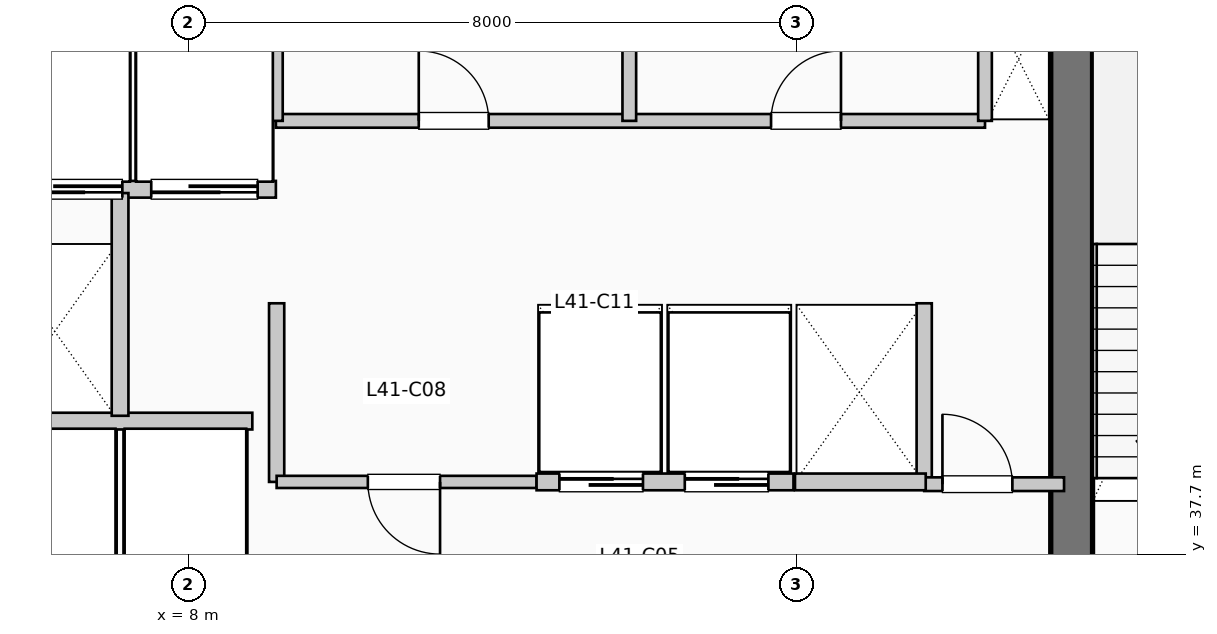
"""IFC4 building model, lengths in metres.
Left out: names, types, materials, properties, quantities, classifications, styles, units other than length and angle.
Written with IfcOpenShell. Run it as: python <this file> out.ifc"""

import sys

from ifc_helpers import new_model, si_unit, direction, frame, frame_2d, origin, place, context, subcontext, project, spatial, rectangle, extrude, element, fill, save


model = new_model("IFC4")
c1 = context("Model", 3, precision=1e-05, world=origin(), true_north=direction((0.0, 1.0)))
c2 = subcontext(c1, "Body", "Model", "MODEL_VIEW")
j1 = project(units=[si_unit("LENGTHUNIT", "METRE"), si_unit("PLANEANGLEUNIT", "RADIAN")], contexts=[c1])
p1 = place(None, origin())
s1 = spatial("IfcSite", under=j1, at=p1, CompositionType="ELEMENT")
p2 = place(p1, origin())
s2 = spatial("IfcBuilding", under=s1, at=p2, CompositionType="ELEMENT")
p3 = place(p2, frame((0.0, 0.0, 170.61)))
s3 = spatial("IfcBuildingStorey", under=s2, at=p3, CompositionType="ELEMENT", Elevation=170.61)
p4 = place(p3, frame((19.62, 37.15, 0.0), z_axis=(0.0, 0.0, 1.0), x_axis=(0.0, 1.0, 0.0)))
e1 = element("IfcWall", 1, at=p4, inside=s3, PredefinedType="SHEAR", context=c2, shape_type="SweptSolid", body=[
    extrude(rectangle(XDim=7.89, YDim=0.55, at=frame_2d((3.945, 0.0))), origin(), (0.0, 0.0, 1.0), 3.96),
])
p5 = place(p3, frame((5.38, 39.45, 0.0), z_axis=(0.0, 0.0, 1.0), x_axis=(1.0, 0.0, 0.0)))
e2 = element("IfcWall", 2, at=p5, inside=s3, PredefinedType="PARTITIONING", context=c2, shape_type="SweptSolid", body=[
    extrude(rectangle(XDim=3.46, YDim=0.22, at=frame_2d((1.73, 0.0))), origin(), (0.0, 0.0, 1.0), 3.61),
])
p6 = place(p3, frame((5.38, 42.5, 0.0), z_axis=(0.0, 0.0, 1.0), x_axis=(1.0, 0.0, 0.0)))
e3 = element("IfcWall", 3, at=p6, inside=s3, PredefinedType="PARTITIONING", context=c2, shape_type="SweptSolid", body=[
    extrude(rectangle(XDim=3.77, YDim=0.22, at=frame_2d((1.885, 0.0))), origin(), (0.0, 0.0, 1.0), 3.61),
])
p7 = place(p6, frame((1.75, 0.0, 0.0), z_axis=(0.0, 0.0, 1.0), x_axis=(-1.0, 0.0, 0.0)))
e4 = element("IfcOpeningElement", 4, at=p7, cuts=e3, PredefinedType="OPENING", context=c2, shape_type="SweptSolid", body=[
    extrude(rectangle(XDim=1.4, YDim=2.2, at=frame_2d((0.7, 1.1))), frame((0.0, 0.12, 0.0), z_axis=(0.0, -1.0, 0.0), x_axis=(1.0, 0.0, 0.0)), (0.0, 0.0, 1.0), 0.24),
])
p8 = place(p6, frame((3.53, 0.0, 0.0), z_axis=(0.0, 0.0, 1.0), x_axis=(-1.0, 0.0, 0.0)))
e5 = element("IfcOpeningElement", 5, at=p8, cuts=e3, PredefinedType="OPENING", context=c2, shape_type="SweptSolid", body=[
    extrude(rectangle(XDim=1.4, YDim=2.2, at=frame_2d((0.7, 1.1))), frame((0.0, 0.12, 0.0), z_axis=(0.0, -1.0, 0.0), x_axis=(1.0, 0.0, 0.0)), (0.0, 0.0, 1.0), 0.24),
])
p9 = place(p3, frame((7.1, 39.52, 0.0), z_axis=(0.0, 0.0, 1.0), x_axis=(0.0, 1.0, 0.0)))
e6 = element("IfcWall", 6, at=p9, inside=s3, PredefinedType="PARTITIONING", context=c2, shape_type="SweptSolid", body=[
    extrude(rectangle(XDim=2.93, YDim=0.22, at=frame_2d((1.465, 0.0))), origin(), (0.0, 0.0, 1.0), 3.61),
])
for number, where, z_axis, x_axis in (
    (7, (9.16, 38.65, 0.0), (0.0, 0.0, 1.0), (0.0, 1.0, 0.0)),
    (8, (17.68, 38.65, 0.0), (0.0, 0.0, 1.0), (0.0, 1.0, 0.0)),
):
    element("IfcWall", number, at=place(p3, frame(where, z_axis=z_axis, x_axis=x_axis)), inside=s3, PredefinedType="PARTITIONING", context=c2, shape_type="SweptSolid", body=[
        extrude(rectangle(XDim=2.35, YDim=0.2, at=frame_2d((1.175, 0.0))), origin(), (0.0, 0.0, 1.0), 3.61),
    ])
p10 = place(p3, frame((17.68, 38.62, 0.0), z_axis=(0.0, 0.0, 1.0), x_axis=(1.0, 0.0, 0.0)))
e9 = element("IfcWall", 9, at=p10, inside=s3, PredefinedType="PARTITIONING", context=c2, shape_type="SweptSolid", body=[
    extrude(rectangle(XDim=1.84, YDim=0.18, at=frame_2d((0.92, 0.0))), origin(), (0.0, 0.0, 1.0), 3.61),
])
p11 = place(p10, frame((0.24, 0.0, 0.0)))
e10 = element("IfcOpeningElement", 10, at=p11, cuts=e9, PredefinedType="OPENING", context=c2, shape_type="SweptSolid", body=[
    extrude(rectangle(XDim=0.92, YDim=2.1, at=frame_2d((0.46, 1.05))), frame((0.0, 0.1, 0.0), z_axis=(0.0, -1.0, 0.0), x_axis=(1.0, 0.0, 0.0)), (0.0, 0.0, 1.0), 0.2),
])
p12 = place(p3, frame((9.16, 38.65, 0.0), z_axis=(0.0, 0.0, 1.0), x_axis=(1.0, 0.0, 0.0)))
e11 = element("IfcWall", 11, at=p12, inside=s3, PredefinedType="PARTITIONING", context=c2, shape_type="SweptSolid", body=[
    extrude(rectangle(XDim=3.42, YDim=0.16, at=frame_2d((1.71, 0.0))), origin(), (0.0, 0.0, 1.0), 3.61),
])
p13 = place(p12, frame((2.15, 0.0, 0.0), z_axis=(0.0, 0.0, 1.0), x_axis=(-1.0, 0.0, 0.0)))
e12 = element("IfcOpeningElement", 12, at=p13, cuts=e11, PredefinedType="OPENING", context=c2, shape_type="SweptSolid", body=[
    extrude(rectangle(XDim=0.95, YDim=2.15, at=frame_2d((0.475, 1.075))), frame((0.0, 0.09, 0.0), z_axis=(0.0, -1.0, 0.0), x_axis=(1.0, 0.0, 0.0)), (0.0, 0.0, 1.0), 0.18),
])
p14 = place(p3, frame((12.58, 38.65, 0.0), z_axis=(0.0, 0.0, 1.0), x_axis=(1.0, 0.0, 0.0)))
e13 = element("IfcWall", 13, at=p14, inside=s3, PredefinedType="PARTITIONING", context=c2, shape_type="SweptSolid", body=[
    extrude(rectangle(XDim=3.38, YDim=0.22, at=frame_2d((1.69, 0.0))), origin(), (0.0, 0.0, 1.0), 3.61),
])
p15 = place(p14, frame((0.3, 0.0, 0.0)))
e14 = element("IfcOpeningElement", 14, at=p15, cuts=e13, PredefinedType="OPENING", context=c2, shape_type="SweptSolid", body=[
    extrude(rectangle(XDim=1.1, YDim=2.2, at=frame_2d((0.55, 1.1))), frame((0.0, 0.12, 0.0), z_axis=(0.0, -1.0, 0.0), x_axis=(1.0, 0.0, 0.0)), (0.0, 0.0, 1.0), 0.24),
])
p16 = place(p14, frame((1.95, 0.0, 0.0)))
e15 = element("IfcOpeningElement", 15, at=p16, cuts=e13, PredefinedType="OPENING", context=c2, shape_type="SweptSolid", body=[
    extrude(rectangle(XDim=1.1, YDim=2.2, at=frame_2d((0.55, 1.1))), frame((0.0, 0.12, 0.0), z_axis=(0.0, -1.0, 0.0), x_axis=(1.0, 0.0, 0.0)), (0.0, 0.0, 1.0), 0.24),
])
p17 = place(p3, frame((15.98, 38.65, 0.0), z_axis=(0.0, 0.0, 1.0), x_axis=(1.0, 0.0, 0.0)))
e16 = element("IfcWall", 16, at=p17, inside=s3, PredefinedType="PARTITIONING", context=c2, shape_type="SweptSolid", body=[
    extrude(rectangle(XDim=1.72, YDim=0.22, at=frame_2d((0.86, 0.0))), origin(), (0.0, 0.0, 1.0), 3.61),
])
p18 = place(p3, frame((9.15, 43.4, 0.0), z_axis=(0.0, 0.0, 1.0), x_axis=(1.0, 0.0, 0.0)))
e17 = element("IfcWall", 17, at=p18, inside=s3, PredefinedType="PLUMBINGWALL", context=c2, shape_type="SweptSolid", body=[
    extrude(rectangle(XDim=9.33, YDim=0.18, at=frame_2d((4.665, 0.0))), origin(), (0.0, 0.0, 1.0), 3.61),
])
p19 = place(p18, frame((1.88, 0.0, 0.0)))
e18 = element("IfcOpeningElement", 18, at=p19, cuts=e17, PredefinedType="OPENING", context=c2, shape_type="SweptSolid", body=[
    extrude(rectangle(XDim=0.92, YDim=2.1, at=frame_2d((0.46, 1.05))), frame((0.0, 0.1, 0.0), z_axis=(0.0, -1.0, 0.0), x_axis=(1.0, 0.0, 0.0)), (0.0, 0.0, 1.0), 0.2),
])
p20 = place(p18, frame((6.515, 0.0, 0.0)))
e19 = element("IfcOpeningElement", 19, at=p20, cuts=e17, PredefinedType="OPENING", context=c2, shape_type="SweptSolid", body=[
    extrude(rectangle(XDim=0.92, YDim=2.1, at=frame_2d((0.46, 1.05))), frame((0.0, 0.1, 0.0), z_axis=(0.0, -1.0, 0.0), x_axis=(1.0, 0.0, 0.0)), (0.0, 0.0, 1.0), 0.2),
])
for number, where, z_axis, x_axis in (
    (20, (9.15, 43.4, 0.0), (0.0, 0.0, 1.0), (0.0, 1.0, 0.0)),
    (21, (18.48, 43.4, 0.0), (0.0, 0.0, 1.0), (0.0, 1.0, 0.0)),
    (22, (13.8, 43.4, 0.0), (0.0, 0.0, 1.0), (0.0, 1.0, 0.0)),
):
    element("IfcWall", number, at=place(p3, frame(where, z_axis=z_axis, x_axis=x_axis)), inside=s3, PredefinedType="PLUMBINGWALL", context=c2, shape_type="SweptSolid", body=[
        extrude(rectangle(XDim=1.88, YDim=0.18, at=frame_2d((0.94, 0.0))), origin(), (0.0, 0.0, 1.0), 3.61),
    ])
p21 = place(p7, origin())
e23 = element("IfcDoor", 23, at=p21, inside=s3, OperationType="SLIDING_TO_LEFT", PredefinedType="DOOR", context=c2, shape_type="SweptSolid", body=[
    extrude(rectangle(XDim=1.4, YDim=2.2, at=frame_2d((0.7, 1.1))), frame((0.0, 0.025, 0.0), z_axis=(0.0, -1.0, 0.0), x_axis=(1.0, 0.0, 0.0)), (0.0, 0.0, 1.0), 0.05),
])
fill(e4, e23)
p22 = place(p8, origin())
e24 = element("IfcDoor", 24, at=p22, inside=s3, OperationType="SLIDING_TO_LEFT", PredefinedType="DOOR", context=c2, shape_type="SweptSolid", body=[
    extrude(rectangle(XDim=1.4, YDim=2.2, at=frame_2d((0.7, 1.1))), frame((0.0, 0.025, 0.0), z_axis=(0.0, -1.0, 0.0), x_axis=(1.0, 0.0, 0.0)), (0.0, 0.0, 1.0), 0.05),
])
fill(e5, e24)
p23 = place(p11, origin())
e25 = element("IfcDoor", 25, at=p23, inside=s3, OperationType="SINGLE_SWING_LEFT", PredefinedType="DOOR", context=c2, shape_type="SweptSolid", body=[
    extrude(rectangle(XDim=0.92, YDim=2.1, at=frame_2d((0.46, 1.05))), frame((0.0, 0.025, 0.0), z_axis=(0.0, -1.0, 0.0), x_axis=(1.0, 0.0, 0.0)), (0.0, 0.0, 1.0), 0.05),
])
fill(e10, e25)
p24 = place(p13, origin())
e26 = element("IfcDoor", 26, at=p24, inside=s3, OperationType="SINGLE_SWING_RIGHT", PredefinedType="DOOR", context=c2, shape_type="SweptSolid", body=[
    extrude(rectangle(XDim=0.95, YDim=2.15, at=frame_2d((0.475, 1.075))), frame((0.0, 0.025, 0.0), z_axis=(0.0, -1.0, 0.0), x_axis=(1.0, 0.0, 0.0)), (0.0, 0.0, 1.0), 0.05),
])
fill(e12, e26)
p25 = place(p15, origin())
e27 = element("IfcDoor", 27, at=p25, inside=s3, OperationType="SLIDING_TO_RIGHT", PredefinedType="DOOR", context=c2, shape_type="SweptSolid", body=[
    extrude(rectangle(XDim=1.1, YDim=2.2, at=frame_2d((0.55, 1.1))), frame((0.0, 0.025, 0.0), z_axis=(0.0, -1.0, 0.0), x_axis=(1.0, 0.0, 0.0)), (0.0, 0.0, 1.0), 0.05),
])
fill(e14, e27)
p26 = place(p16, origin())
e28 = element("IfcDoor", 28, at=p26, inside=s3, OperationType="SLIDING_TO_RIGHT", PredefinedType="DOOR", context=c2, shape_type="SweptSolid", body=[
    extrude(rectangle(XDim=1.1, YDim=2.2, at=frame_2d((0.55, 1.1))), frame((0.0, 0.025, 0.0), z_axis=(0.0, -1.0, 0.0), x_axis=(1.0, 0.0, 0.0)), (0.0, 0.0, 1.0), 0.05),
])
fill(e15, e28)
p27 = place(p19, origin())
e29 = element("IfcDoor", 29, at=p27, inside=s3, OperationType="SINGLE_SWING_LEFT", PredefinedType="DOOR", context=c2, shape_type="SweptSolid", body=[
    extrude(rectangle(XDim=0.92, YDim=2.1, at=frame_2d((0.46, 1.05))), frame((0.0, 0.025, 0.0), z_axis=(0.0, -1.0, 0.0), x_axis=(1.0, 0.0, 0.0)), (0.0, 0.0, 1.0), 0.05),
])
fill(e18, e29)
p28 = place(p20, origin())
e30 = element("IfcDoor", 30, at=p28, inside=s3, OperationType="SINGLE_SWING_RIGHT", PredefinedType="DOOR", context=c2, shape_type="SweptSolid", body=[
    extrude(rectangle(XDim=0.92, YDim=2.1, at=frame_2d((0.46, 1.05))), frame((0.0, 0.025, 0.0), z_axis=(0.0, -1.0, 0.0), x_axis=(1.0, 0.0, 0.0)), (0.0, 0.0, 1.0), 0.05),
])
fill(e19, e30)
save(model, sys.argv[1])
